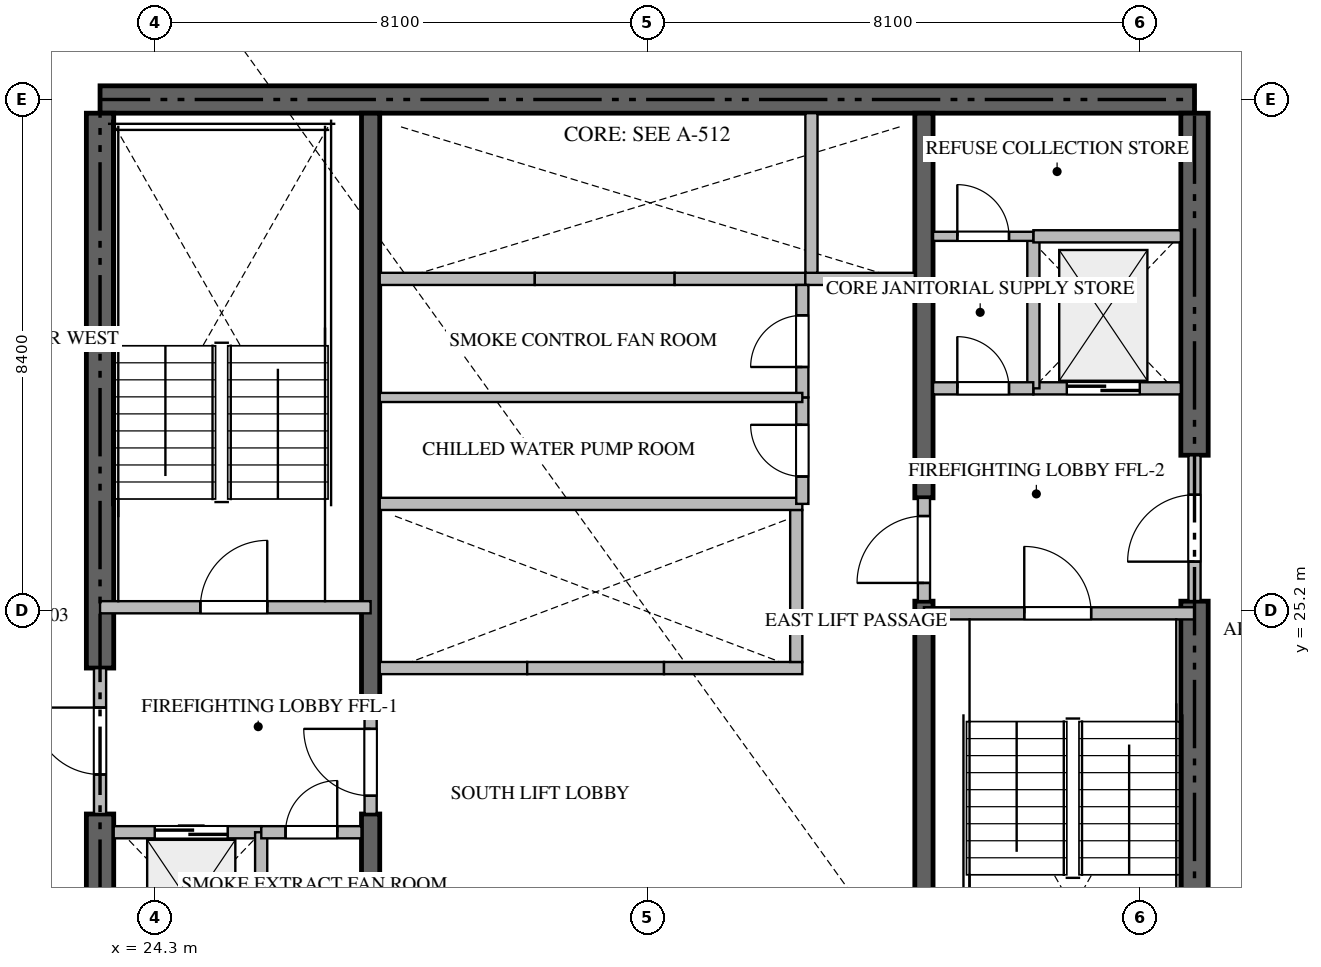
"""IFC4 building model, lengths in metres.
Left out: names, types, materials, properties, quantities, classifications, styles, units other than length and angle.
Written with IfcOpenShell. Run it as: python <this file> out.ifc"""

import sys

from ifc_helpers import new_model, si_unit, direction, frame, frame_2d, origin, place, context, subcontext, project, spatial, rectangle, extrude, source, transform, mapped, element, fill, save


model = new_model("IFC4")
c1 = context("Model", 3, precision=1e-05, world=origin(), true_north=direction((0.0, 1.0)))
c2 = subcontext(c1, "Body", "Model", "MODEL_VIEW")
j1 = project(units=[si_unit("LENGTHUNIT", "METRE"), si_unit("PLANEANGLEUNIT", "RADIAN")], contexts=[c1])
p1 = place(None, origin())
s1 = spatial("IfcSite", under=j1, at=p1, CompositionType="ELEMENT")
p2 = place(p1, origin())
s2 = spatial("IfcBuilding", under=s1, at=p2, CompositionType="ELEMENT")
p3 = place(p2, frame((0.0, 0.0, 75.45)))
s3 = spatial("IfcBuildingStorey", under=s2, at=p3, CompositionType="ELEMENT", Elevation=75.45)
p4 = place(p3, frame((41.4, 33.6, -0.26), z_axis=(0.0, 0.0, 1.0), x_axis=(-1.0, 0.0, 0.0)))
e1 = element("IfcWall", 1, at=p4, inside=s3, PredefinedType="SHEAR", context=c2, shape_type="SweptSolid", body=[
    extrude(rectangle(XDim=18.0, YDim=0.45, at=frame_2d((9.0, 0.0))), origin(), (0.0, 0.0, 1.0), 3.748),
])
p5 = place(p3, frame((23.4, 17.025, -0.26), z_axis=(0.0, 0.0, 1.0), x_axis=(0.0, 1.0, 0.0)))
e2 = element("IfcWall", 2, at=p5, inside=s3, PredefinedType="SHEAR", context=c2, shape_type="SweptSolid", body=[
    extrude(rectangle(XDim=4.825, YDim=0.45, at=frame_2d((2.413, 0.0))), origin(), (0.0, 0.0, 1.0), 3.748),
])
p6 = place(p3, frame((23.4, 24.25, -0.26), z_axis=(0.0, 0.0, 1.0), x_axis=(0.0, 1.0, 0.0)))
e3 = element("IfcWall", 3, at=p6, inside=s3, PredefinedType="SHEAR", context=c2, shape_type="SweptSolid", body=[
    extrude(rectangle(XDim=9.125, YDim=0.45, at=frame_2d((4.562, 0.0))), origin(), (0.0, 0.0, 1.0), 3.748),
])
p7 = place(p3, frame((41.4, 17.025, -0.26), z_axis=(0.0, 0.0, 1.0), x_axis=(0.0, 1.0, 0.0)))
e4 = element("IfcWall", 4, at=p7, inside=s3, PredefinedType="SHEAR", context=c2, shape_type="SweptSolid", body=[
    extrude(rectangle(XDim=8.325, YDim=0.45, at=frame_2d((4.163, 0.0))), origin(), (0.0, 0.0, 1.0), 3.748),
])
p8 = place(p3, frame((41.4, 27.75, -0.26), z_axis=(0.0, 0.0, 1.0), x_axis=(0.0, 1.0, 0.0)))
e5 = element("IfcWall", 5, at=p8, inside=s3, PredefinedType="SHEAR", context=c2, shape_type="SweptSolid", body=[
    extrude(rectangle(XDim=5.625, YDim=0.45, at=frame_2d((2.812, 0.0))), origin(), (0.0, 0.0, 1.0), 3.748),
])
p9 = place(p3, frame((27.85, 17.025, -0.26), z_axis=(0.0, 0.0, 1.0), x_axis=(0.0, 1.0, 0.0)))
e6 = element("IfcWall", 6, at=p9, inside=s3, PredefinedType="SHEAR", context=c2, shape_type="SweptSolid", body=[
    extrude(rectangle(XDim=4.825, YDim=0.3, at=frame_2d((2.413, 0.0))), origin(), (0.0, 0.0, 1.0), 3.748),
])
p10 = place(p3, frame((27.85, 23.55, -0.26), z_axis=(0.0, 0.0, 1.0), x_axis=(0.0, 1.0, 0.0)))
e7 = element("IfcWall", 7, at=p10, inside=s3, PredefinedType="SHEAR", context=c2, shape_type="SweptSolid", body=[
    extrude(rectangle(XDim=9.825, YDim=0.3, at=frame_2d((4.913, 0.0))), origin(), (0.0, 0.0, 1.0), 3.748),
])
p11 = place(p3, frame((36.95, 17.025, -0.26), z_axis=(0.0, 0.0, 1.0), x_axis=(0.0, 1.0, 0.0)))
e8 = element("IfcWall", 8, at=p11, inside=s3, PredefinedType="SHEAR", context=c2, shape_type="SweptSolid", body=[
    extrude(rectangle(XDim=8.325, YDim=0.3, at=frame_2d((4.163, 0.0))), origin(), (0.0, 0.0, 1.0), 3.748),
])
p12 = place(p3, frame((36.95, 27.05, -0.26), z_axis=(0.0, 0.0, 1.0), x_axis=(0.0, 1.0, 0.0)))
e9 = element("IfcWall", 9, at=p12, inside=s3, PredefinedType="SHEAR", context=c2, shape_type="SweptSolid", body=[
    extrude(rectangle(XDim=6.325, YDim=0.3, at=frame_2d((3.163, 0.0))), origin(), (0.0, 0.0, 1.0), 3.748),
])
p13 = place(p3, frame((23.4, 25.25, 0.0), z_axis=(0.0, 0.0, 1.0), x_axis=(1.0, 0.0, 0.0)))
e10 = element("IfcWall", 10, at=p13, inside=s3, PredefinedType="STANDARD", context=c2, shape_type="SweptSolid", body=[
    extrude(rectangle(XDim=4.45, YDim=0.2, at=frame_2d((2.225, 0.0))), origin(), (0.0, 0.0, 1.0), 3.49),
])
p14 = place(p13, frame((1.65, 0.0, 0.0)))
e11 = element("IfcOpeningElement", 11, at=p14, cuts=e10, PredefinedType="OPENING", context=c2, shape_type="SweptSolid", body=[
    extrude(rectangle(XDim=1.1, YDim=2.15, at=frame_2d((0.55, 1.075))), frame((0.0, 0.11, 0.0), z_axis=(0.0, -1.0, 0.0), x_axis=(1.0, 0.0, 0.0)), (0.0, 0.0, 1.0), 0.22),
])
p15 = place(p3, frame((36.95, 25.15, 0.0), z_axis=(0.0, 0.0, 1.0), x_axis=(1.0, 0.0, 0.0)))
e12 = element("IfcWall", 12, at=p15, inside=s3, PredefinedType="STANDARD", context=c2, shape_type="SweptSolid", body=[
    extrude(rectangle(XDim=4.45, YDim=0.2, at=frame_2d((2.225, 0.0))), origin(), (0.0, 0.0, 1.0), 3.49),
])
p16 = place(p15, frame((1.65, 0.0, 0.0)))
e13 = element("IfcOpeningElement", 13, at=p16, cuts=e12, PredefinedType="OPENING", context=c2, shape_type="SweptSolid", body=[
    extrude(rectangle(XDim=1.1, YDim=2.15, at=frame_2d((0.55, 1.075))), frame((0.0, 0.11, 0.0), z_axis=(0.0, -1.0, 0.0), x_axis=(1.0, 0.0, 0.0)), (0.0, 0.0, 1.0), 0.22),
])
p17 = place(p3, frame((23.625, 21.55, 0.0), z_axis=(0.0, 0.0, 1.0), x_axis=(1.0, 0.0, 0.0)))
e14 = element("IfcWall", 14, at=p17, inside=s3, PredefinedType="STANDARD", context=c2, shape_type="SweptSolid", body=[
    extrude(rectangle(XDim=2.425, YDim=0.2, at=frame_2d((1.212, 0.0))), origin(), (0.0, 0.0, 1.0), 3.49),
])
p18 = place(p17, frame((0.675, 0.0, 0.0)))
e15 = element("IfcOpeningElement", 15, at=p18, cuts=e14, PredefinedType="OPENING", context=c2, shape_type="SweptSolid", body=[
    extrude(rectangle(XDim=1.2, YDim=2.2, at=frame_2d((0.6, 1.1))), frame((0.0, 0.11, 0.0), z_axis=(0.0, -1.0, 0.0), x_axis=(1.0, 0.0, 0.0)), (0.0, 0.0, 1.0), 0.22),
])
p19 = place(p3, frame((38.75, 28.85, 0.0), z_axis=(0.0, 0.0, 1.0), x_axis=(1.0, 0.0, 0.0)))
e16 = element("IfcWall", 16, at=p19, inside=s3, PredefinedType="STANDARD", context=c2, shape_type="SweptSolid", body=[
    extrude(rectangle(XDim=2.425, YDim=0.2, at=frame_2d((1.212, 0.0))), origin(), (0.0, 0.0, 1.0), 3.49),
])
p20 = place(p19, frame((0.55, 0.0, 0.0)))
e17 = element("IfcOpeningElement", 17, at=p20, cuts=e16, PredefinedType="OPENING", context=c2, shape_type="SweptSolid", body=[
    extrude(rectangle(XDim=1.2, YDim=2.2, at=frame_2d((0.6, 1.1))), frame((0.0, 0.11, 0.0), z_axis=(0.0, -1.0, 0.0), x_axis=(1.0, 0.0, 0.0)), (0.0, 0.0, 1.0), 0.22),
])
p21 = place(p3, frame((28.0, 24.25, 0.0), z_axis=(0.0, 0.0, 1.0), x_axis=(1.0, 0.0, 0.0)))
e18 = element("IfcWall", 18, at=p21, inside=s3, PredefinedType="STANDARD", context=c2, shape_type="SweptSolid", body=[
    extrude(rectangle(XDim=2.425, YDim=0.2, at=frame_2d((1.212, 0.0))), origin(), (0.0, 0.0, 1.0), 3.49),
])
p22 = place(p3, frame((30.425, 24.25, 0.0), z_axis=(0.0, 0.0, 1.0), x_axis=(1.0, 0.0, 0.0)))
e19 = element("IfcWall", 19, at=p22, inside=s3, PredefinedType="STANDARD", context=c2, shape_type="SweptSolid", body=[
    extrude(rectangle(XDim=2.25, YDim=0.2, at=frame_2d((1.125, 0.0))), origin(), (0.0, 0.0, 1.0), 3.49),
])
p23 = place(p3, frame((32.675, 24.25, 0.0), z_axis=(0.0, 0.0, 1.0), x_axis=(1.0, 0.0, 0.0)))
e20 = element("IfcWall", 20, at=p23, inside=s3, PredefinedType="STANDARD", context=c2, shape_type="SweptSolid", body=[
    extrude(rectangle(XDim=2.275, YDim=0.2, at=frame_2d((1.137, 0.0))), origin(), (0.0, 0.0, 1.0), 3.49),
])
p24 = place(p3, frame((34.85, 24.35, 0.0), z_axis=(0.0, 0.0, 1.0), x_axis=(0.0, 1.0, 0.0)))
e21 = element("IfcWall", 21, at=p24, inside=s3, PredefinedType="STANDARD", context=c2, shape_type="SweptSolid", body=[
    extrude(rectangle(XDim=2.5, YDim=0.2, at=frame_2d((1.25, 0.0))), origin(), (0.0, 0.0, 1.0), 3.49),
])
p25 = place(p3, frame((28.0, 30.65, 0.0), z_axis=(0.0, 0.0, 1.0), x_axis=(1.0, 0.0, 0.0)))
e22 = element("IfcWall", 22, at=p25, inside=s3, PredefinedType="STANDARD", context=c2, shape_type="SweptSolid", body=[
    extrude(rectangle(XDim=2.55, YDim=0.2, at=frame_2d((1.275, 0.0))), origin(), (0.0, 0.0, 1.0), 3.49),
])
p26 = place(p3, frame((30.55, 30.65, 0.0), z_axis=(0.0, 0.0, 1.0), x_axis=(1.0, 0.0, 0.0)))
e23 = element("IfcWall", 23, at=p26, inside=s3, PredefinedType="STANDARD", context=c2, shape_type="SweptSolid", body=[
    extrude(rectangle(XDim=2.3, YDim=0.2, at=frame_2d((1.15, 0.0))), origin(), (0.0, 0.0, 1.0), 3.49),
])
p27 = place(p3, frame((32.85, 30.65, 0.0), z_axis=(0.0, 0.0, 1.0), x_axis=(1.0, 0.0, 0.0)))
e24 = element("IfcWall", 24, at=p27, inside=s3, PredefinedType="STANDARD", context=c2, shape_type="SweptSolid", body=[
    extrude(rectangle(XDim=2.15, YDim=0.2, at=frame_2d((1.075, 0.0))), origin(), (0.0, 0.0, 1.0), 3.49),
])
p28 = place(p3, frame((35.0, 30.65, 0.0), z_axis=(0.0, 0.0, 1.0), x_axis=(1.0, 0.0, 0.0)))
e25 = element("IfcWall", 25, at=p28, inside=s3, PredefinedType="STANDARD", context=c2, shape_type="SweptSolid", body=[
    extrude(rectangle(XDim=1.8, YDim=0.2, at=frame_2d((0.9, 0.0))), origin(), (0.0, 0.0, 1.0), 3.49),
])
p29 = place(p3, frame((35.1, 30.75, 0.0), z_axis=(0.0, 0.0, 1.0), x_axis=(0.0, 1.0, 0.0)))
e26 = element("IfcWall", 26, at=p29, inside=s3, PredefinedType="STANDARD", context=c2, shape_type="SweptSolid", body=[
    extrude(rectangle(XDim=2.625, YDim=0.2, at=frame_2d((1.312, 0.0))), origin(), (0.0, 0.0, 1.0), 3.49),
])
p30 = place(p3, frame((26.05, 19.05, 0.0), z_axis=(0.0, 0.0, 1.0), x_axis=(0.0, 1.0, 0.0)))
e27 = element("IfcWall", 27, at=p30, inside=s3, PredefinedType="STANDARD", context=c2, shape_type="SweptSolid", body=[
    extrude(rectangle(XDim=2.5, YDim=0.2, at=frame_2d((1.25, 0.0))), origin(), (0.0, 0.0, 1.0), 3.49),
])
p31 = place(p3, frame((26.052, 21.55, 0.0), z_axis=(0.0, 0.0, 1.0), x_axis=(1.0, 0.0, 0.0)))
e28 = element("IfcWall", 28, at=p31, inside=s3, PredefinedType="STANDARD", context=c2, shape_type="SweptSolid", body=[
    extrude(rectangle(XDim=1.648, YDim=0.2, at=frame_2d((0.824, 0.0))), origin(), (0.0, 0.0, 1.0), 3.49),
])
p32 = place(p31, frame((0.399, 0.0, 0.0)))
e29 = element("IfcOpeningElement", 29, at=p32, cuts=e28, PredefinedType="OPENING", context=c2, shape_type="SweptSolid", body=[
    extrude(rectangle(XDim=0.85, YDim=2.1, at=frame_2d((0.425, 1.05))), frame((0.0, 0.11, 0.0), z_axis=(0.0, -1.0, 0.0), x_axis=(1.0, 0.0, 0.0)), (0.0, 0.0, 1.0), 0.22),
])
p33 = place(p3, frame((38.75, 28.85, 0.0), z_axis=(0.0, 0.0, 1.0), x_axis=(0.0, 1.0, 0.0)))
e30 = element("IfcWall", 30, at=p33, inside=s3, PredefinedType="STANDARD", context=c2, shape_type="SweptSolid", body=[
    extrude(rectangle(XDim=2.5, YDim=0.2, at=frame_2d((1.25, 0.0))), origin(), (0.0, 0.0, 1.0), 3.49),
])
p34 = place(p3, frame((38.75, 31.35, 0.0), z_axis=(0.0, 0.0, 1.0), x_axis=(1.0, 0.0, 0.0)))
e31 = element("IfcWall", 31, at=p34, inside=s3, PredefinedType="STANDARD", context=c2, shape_type="SweptSolid", body=[
    extrude(rectangle(XDim=2.425, YDim=0.2, at=frame_2d((1.212, 0.0))), origin(), (0.0, 0.0, 1.0), 3.49),
])
p35 = place(p3, frame((37.1, 28.85, 0.0), z_axis=(0.0, 0.0, 1.0), x_axis=(1.0, 0.0, 0.0)))
e32 = element("IfcWall", 32, at=p35, inside=s3, PredefinedType="STANDARD", context=c2, shape_type="SweptSolid", body=[
    extrude(rectangle(XDim=1.648, YDim=0.2, at=frame_2d((0.824, 0.0))), origin(), (0.0, 0.0, 1.0), 3.49),
])
p36 = place(p35, frame((0.399, 0.0, 0.0)))
e33 = element("IfcOpeningElement", 33, at=p36, cuts=e32, PredefinedType="OPENING", context=c2, shape_type="SweptSolid", body=[
    extrude(rectangle(XDim=0.85, YDim=2.1, at=frame_2d((0.425, 1.05))), frame((0.0, 0.11, 0.0), z_axis=(0.0, -1.0, 0.0), x_axis=(1.0, 0.0, 0.0)), (0.0, 0.0, 1.0), 0.22),
])
p37 = place(p3, frame((23.4, 21.852, 0.0), z_axis=(0.0, 0.0, 1.0), x_axis=(0.0, 1.0, 0.0)))
e34 = element("IfcWall", 34, at=p37, inside=s3, PredefinedType="STANDARD", context=c2, shape_type="SweptSolid", body=[
    extrude(rectangle(XDim=2.396, YDim=0.2, at=frame_2d((1.198, 0.0))), origin(), (0.0, 0.0, 1.0), 3.49),
])
p38 = place(p37, frame((0.648, 0.0, 0.0)))
e35 = element("IfcOpeningElement", 35, at=p38, cuts=e34, PredefinedType="OPENING", context=c2, shape_type="SweptSolid", body=[
    extrude(rectangle(XDim=1.1, YDim=2.15, at=frame_2d((0.55, 1.075))), frame((0.0, 0.11, 0.0), z_axis=(0.0, -1.0, 0.0), x_axis=(1.0, 0.0, 0.0)), (0.0, 0.0, 1.0), 0.22),
])
p39 = place(p3, frame((41.4, 25.352, 0.0), z_axis=(0.0, 0.0, 1.0), x_axis=(0.0, 1.0, 0.0)))
e36 = element("IfcWall", 36, at=p39, inside=s3, PredefinedType="STANDARD", context=c2, shape_type="SweptSolid", body=[
    extrude(rectangle(XDim=2.396, YDim=0.2, at=frame_2d((1.198, 0.0))), origin(), (0.0, 0.0, 1.0), 3.49),
])
p40 = place(p39, frame((0.648, 0.0, 0.0)))
e37 = element("IfcOpeningElement", 37, at=p40, cuts=e36, PredefinedType="OPENING", context=c2, shape_type="SweptSolid", body=[
    extrude(rectangle(XDim=1.1, YDim=2.15, at=frame_2d((0.55, 1.075))), frame((0.0, 0.11, 0.0), z_axis=(0.0, -1.0, 0.0), x_axis=(1.0, 0.0, 0.0)), (0.0, 0.0, 1.0), 0.22),
])
p41 = place(p3, frame((27.85, 21.852, 0.0), z_axis=(0.0, 0.0, 1.0), x_axis=(0.0, 1.0, 0.0)))
e38 = element("IfcWall", 38, at=p41, inside=s3, PredefinedType="STANDARD", context=c2, shape_type="SweptSolid", body=[
    extrude(rectangle(XDim=1.696, YDim=0.2, at=frame_2d((0.848, 0.0))), origin(), (0.0, 0.0, 1.0), 3.49),
])
p42 = place(p41, frame((0.298, 0.0, 0.0)))
e39 = element("IfcOpeningElement", 39, at=p42, cuts=e38, PredefinedType="OPENING", context=c2, shape_type="SweptSolid", body=[
    extrude(rectangle(XDim=1.1, YDim=2.15, at=frame_2d((0.55, 1.075))), frame((0.0, 0.11, 0.0), z_axis=(0.0, -1.0, 0.0), x_axis=(1.0, 0.0, 0.0)), (0.0, 0.0, 1.0), 0.22),
])
p43 = place(p3, frame((36.95, 25.352, 0.0), z_axis=(0.0, 0.0, 1.0), x_axis=(0.0, 1.0, 0.0)))
e40 = element("IfcWall", 40, at=p43, inside=s3, PredefinedType="STANDARD", context=c2, shape_type="SweptSolid", body=[
    extrude(rectangle(XDim=1.696, YDim=0.2, at=frame_2d((0.848, 0.0))), origin(), (0.0, 0.0, 1.0), 3.49),
])
p44 = place(p43, frame((0.298, 0.0, 0.0)))
e41 = element("IfcOpeningElement", 41, at=p44, cuts=e40, PredefinedType="OPENING", context=c2, shape_type="SweptSolid", body=[
    extrude(rectangle(XDim=1.1, YDim=2.15, at=frame_2d((0.55, 1.075))), frame((0.0, 0.11, 0.0), z_axis=(0.0, -1.0, 0.0), x_axis=(1.0, 0.0, 0.0)), (0.0, 0.0, 1.0), 0.22),
])
p45 = place(p3, frame((28.0, 26.95, 0.0), z_axis=(0.0, 0.0, 1.0), x_axis=(1.0, 0.0, 0.0)))
e42 = element("IfcWall", 42, at=p45, inside=s3, PredefinedType="STANDARD", context=c2, shape_type="SweptSolid", body=[
    extrude(rectangle(XDim=6.95, YDim=0.2, at=frame_2d((3.475, 0.0))), origin(), (0.0, 0.0, 1.0), 3.49),
])
p46 = place(p3, frame((37.1, 31.35, 0.0), z_axis=(0.0, 0.0, 1.0), x_axis=(1.0, 0.0, 0.0)))
e43 = element("IfcWall", 43, at=p46, inside=s3, PredefinedType="PARTITIONING", context=c2, shape_type="SweptSolid", body=[
    extrude(rectangle(XDim=1.648, YDim=0.15, at=frame_2d((0.824, 0.0))), origin(), (0.0, 0.0, 1.0), 3.49),
])
p47 = place(p46, frame((0.399, 0.0, 0.0)))
e44 = element("IfcOpeningElement", 44, at=p47, cuts=e43, PredefinedType="OPENING", context=c2, shape_type="SweptSolid", body=[
    extrude(rectangle(XDim=0.85, YDim=2.1, at=frame_2d((0.425, 1.05))), frame((0.0, 0.085, 0.0), z_axis=(0.0, -1.0, 0.0), x_axis=(1.0, 0.0, 0.0)), (0.0, 0.0, 1.0), 0.17),
])
p48 = place(p3, frame((34.95, 26.95, 0.0), z_axis=(0.0, 0.0, 1.0), x_axis=(0.0, 1.0, 0.0)))
e45 = element("IfcWall", 45, at=p48, inside=s3, PredefinedType="STANDARD", context=c2, shape_type="SweptSolid", body=[
    extrude(rectangle(XDim=1.75, YDim=0.2, at=frame_2d((0.875, 0.0))), origin(), (0.0, 0.0, 1.0), 3.49),
])
p49 = place(p48, frame((0.45, 0.0, 0.0)))
e46 = element("IfcOpeningElement", 46, at=p49, cuts=e45, PredefinedType="OPENING", context=c2, shape_type="SweptSolid", body=[
    extrude(rectangle(XDim=0.85, YDim=2.1, at=frame_2d((0.425, 1.05))), frame((0.0, 0.11, 0.0), z_axis=(0.0, -1.0, 0.0), x_axis=(1.0, 0.0, 0.0)), (0.0, 0.0, 1.0), 0.22),
])
p50 = place(p3, frame((34.95, 28.702, 0.0), z_axis=(0.0, 0.0, 1.0), x_axis=(0.0, 1.0, 0.0)))
e47 = element("IfcWall", 47, at=p50, inside=s3, PredefinedType="STANDARD", context=c2, shape_type="SweptSolid", body=[
    extrude(rectangle(XDim=1.848, YDim=0.2, at=frame_2d((0.924, 0.0))), origin(), (0.0, 0.0, 1.0), 3.49),
])
p51 = place(p50, frame((0.499, 0.0, 0.0)))
e48 = element("IfcOpeningElement", 48, at=p51, cuts=e47, PredefinedType="OPENING", context=c2, shape_type="SweptSolid", body=[
    extrude(rectangle(XDim=0.85, YDim=2.1, at=frame_2d((0.425, 1.05))), frame((0.0, 0.11, 0.0), z_axis=(0.0, -1.0, 0.0), x_axis=(1.0, 0.0, 0.0)), (0.0, 0.0, 1.0), 0.22),
])
p52 = place(p3, frame((28.0, 28.7, 0.0), z_axis=(0.0, 0.0, 1.0), x_axis=(1.0, 0.0, 0.0)))
e49 = element("IfcWall", 49, at=p52, inside=s3, PredefinedType="PARTITIONING", context=c2, shape_type="SweptSolid", body=[
    extrude(rectangle(XDim=6.95, YDim=0.15, at=frame_2d((3.475, 0.0))), origin(), (0.0, 0.0, 1.0), 3.49),
])
m1 = source(origin(), c2, "Body", "SweptSolid", [
    extrude(rectangle(XDim=1.1, YDim=2.15, at=frame_2d((0.55, 1.075))), frame((0.0, 0.025, 0.0), z_axis=(0.0, -1.0, 0.0), x_axis=(1.0, 0.0, 0.0)), (0.0, 0.0, 1.0), 0.05),
])
p53 = place(p14, origin())
e50 = element("IfcDoor", 50, at=p53, inside=s3, OperationType="SINGLE_SWING_RIGHT", PredefinedType="DOOR", context=c2, shape_type="MappedRepresentation", body=[
    mapped(m1, transform((0.0, 0.0, 0.0), scale=1.0)),
])
fill(e11, e50)
p54 = place(p16, origin())
e51 = element("IfcDoor", 51, at=p54, inside=s3, OperationType="SINGLE_SWING_LEFT", PredefinedType="DOOR", context=c2, shape_type="MappedRepresentation", body=[
    mapped(m1, transform((0.0, 0.0, 0.0), scale=1.0)),
])
fill(e13, e51)
m2 = source(origin(), c2, "Body", "SweptSolid", [
    extrude(rectangle(XDim=1.2, YDim=2.2, at=frame_2d((0.6, 1.1))), frame((0.0, 0.025, 0.0), z_axis=(0.0, -1.0, 0.0), x_axis=(1.0, 0.0, 0.0)), (0.0, 0.0, 1.0), 0.05),
])
p55 = place(p18, origin())
e52 = element("IfcDoor", 52, at=p55, inside=s3, OperationType="DOUBLE_DOOR_SLIDING", PredefinedType="DOOR", context=c2, shape_type="MappedRepresentation", body=[
    mapped(m2, transform((0.0, 0.0, 0.0), scale=1.0)),
])
fill(e15, e52)
p56 = place(p20, origin())
e53 = element("IfcDoor", 53, at=p56, inside=s3, OperationType="DOUBLE_DOOR_SLIDING", PredefinedType="DOOR", context=c2, shape_type="MappedRepresentation", body=[
    mapped(m2, transform((0.0, 0.0, 0.0), scale=1.0)),
])
fill(e17, e53)
m3 = source(origin(), c2, "Body", "SweptSolid", [
    extrude(rectangle(XDim=0.85, YDim=2.1, at=frame_2d((0.425, 1.05))), frame((0.0, 0.025, 0.0), z_axis=(0.0, -1.0, 0.0), x_axis=(1.0, 0.0, 0.0)), (0.0, 0.0, 1.0), 0.05),
])
p57 = place(p32, origin())
e54 = element("IfcDoor", 54, at=p57, inside=s3, OperationType="SINGLE_SWING_RIGHT", PredefinedType="DOOR", context=c2, shape_type="MappedRepresentation", body=[
    mapped(m3, transform((0.0, 0.0, 0.0), scale=1.0)),
])
fill(e29, e54)
p58 = place(p36, origin())
e55 = element("IfcDoor", 55, at=p58, inside=s3, OperationType="SINGLE_SWING_LEFT", PredefinedType="DOOR", context=c2, shape_type="MappedRepresentation", body=[
    mapped(m3, transform((0.0, 0.0, 0.0), scale=1.0)),
])
fill(e33, e55)
p59 = place(p38, origin())
e56 = element("IfcDoor", 56, at=p59, inside=s3, OperationType="SINGLE_SWING_RIGHT", PredefinedType="DOOR", context=c2, shape_type="MappedRepresentation", body=[
    mapped(m1, transform((0.0, 0.0, 0.0), scale=1.0)),
])
fill(e35, e56)
p60 = place(p40, origin())
e57 = element("IfcDoor", 57, at=p60, inside=s3, OperationType="SINGLE_SWING_LEFT", PredefinedType="DOOR", context=c2, shape_type="MappedRepresentation", body=[
    mapped(m1, transform((0.0, 0.0, 0.0), scale=1.0)),
])
fill(e37, e57)
p61 = place(p42, origin())
e58 = element("IfcDoor", 58, at=p61, inside=s3, OperationType="SINGLE_SWING_RIGHT", PredefinedType="DOOR", context=c2, shape_type="MappedRepresentation", body=[
    mapped(m1, transform((0.0, 0.0, 0.0), scale=1.0)),
])
fill(e39, e58)
p62 = place(p44, origin())
e59 = element("IfcDoor", 59, at=p62, inside=s3, OperationType="SINGLE_SWING_LEFT", PredefinedType="DOOR", context=c2, shape_type="MappedRepresentation", body=[
    mapped(m1, transform((0.0, 0.0, 0.0), scale=1.0)),
])
fill(e41, e59)
p63 = place(p47, origin())
e60 = element("IfcDoor", 60, at=p63, inside=s3, OperationType="SINGLE_SWING_LEFT", PredefinedType="DOOR", context=c2, shape_type="MappedRepresentation", body=[
    mapped(m3, transform((0.0, 0.0, 0.0), scale=1.0)),
])
fill(e44, e60)
p64 = place(p49, origin())
e61 = element("IfcDoor", 61, at=p64, inside=s3, OperationType="SINGLE_SWING_RIGHT", PredefinedType="DOOR", context=c2, shape_type="MappedRepresentation", body=[
    mapped(m3, transform((0.0, 0.0, 0.0), scale=1.0)),
])
fill(e46, e61)
p65 = place(p51, origin())
e62 = element("IfcDoor", 62, at=p65, inside=s3, OperationType="SINGLE_SWING_LEFT", PredefinedType="DOOR", context=c2, shape_type="MappedRepresentation", body=[
    mapped(m3, transform((0.0, 0.0, 0.0), scale=1.0)),
])
fill(e48, e62)
save(model, sys.argv[1])
